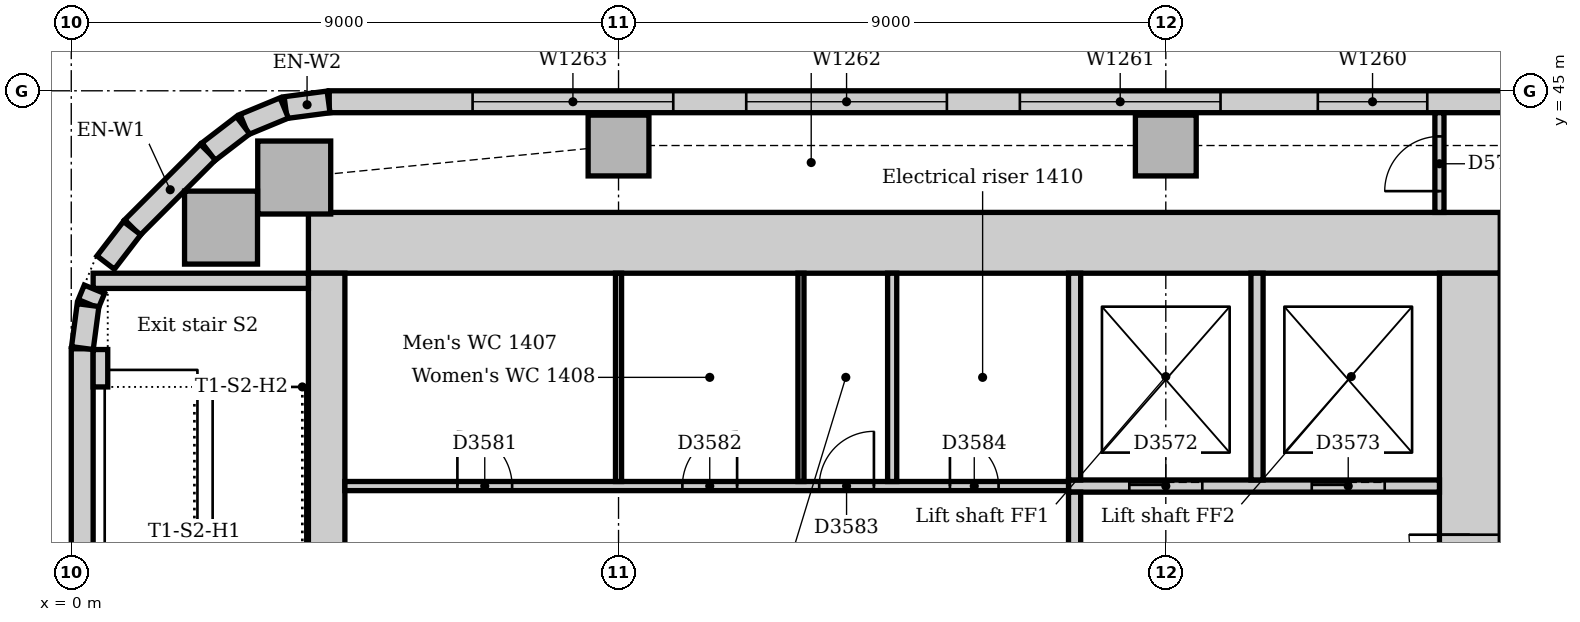
"""IFC4 building model, lengths in metres.
Left out: names, types, materials, properties, quantities, classifications, styles, units other than length and angle.
Written with IfcOpenShell. Run it as: python <this file> out.ifc"""

import sys

from ifc_helpers import new_model, si_unit, direction, frame, frame_2d, origin, origin_2d, place, context, subcontext, project, spatial, rectangle, extrude, element, fill, save


model = new_model("IFC4")
c1 = context("Model", 3, precision=1e-05, world=origin(), true_north=direction((0.0, 1.0)))
c2 = subcontext(c1, "Body", "Model", "MODEL_VIEW")
j1 = project(units=[si_unit("LENGTHUNIT", "METRE"), si_unit("PLANEANGLEUNIT", "RADIAN")], contexts=[c1])
p1 = place(None, origin())
s1 = spatial("IfcSite", under=j1, at=p1, CompositionType="ELEMENT")
p2 = place(p1, origin())
s2 = spatial("IfcBuilding", under=s1, at=p2, CompositionType="ELEMENT")
p3 = place(p2, frame((0.0, 0.0, 63.0)))
s3 = spatial("IfcBuildingStorey", under=s2, at=p3, CompositionType="ELEMENT", Elevation=63.0)
p4 = place(p3, frame((23.5, 42.5, 0.0), z_axis=(0.0, 0.0, 1.0), x_axis=(-1.0, 0.0, 0.0)))
e1 = element("IfcWall", 1, at=p4, inside=s3, PredefinedType="SOLIDWALL", context=c2, shape_type="SweptSolid", body=[
    extrude(rectangle(XDim=19.6, YDim=1.0, at=frame_2d((9.8, 0.0))), origin(), (0.0, 0.0, 1.0), 4.0),
])
p5 = place(p3, frame((23.0, 31.5, 0.0), z_axis=(0.0, 0.0, 1.0), x_axis=(0.0, 1.0, 0.0)))
e2 = element("IfcWall", 2, at=p5, inside=s3, PredefinedType="SOLIDWALL", context=c2, shape_type="SweptSolid", body=[
    extrude(rectangle(XDim=10.5, YDim=1.0, at=frame_2d((5.25, 0.0))), origin(), (0.0, 0.0, 1.0), 4.0),
])
p6 = place(p5, frame((3.15, 0.0, 0.0)))
e3 = element("IfcOpeningElement", 3, at=p6, cuts=e2, PredefinedType="OPENING", context=c2, shape_type="SweptSolid", body=[
    extrude(rectangle(XDim=1.0, YDim=2.1, at=frame_2d((0.5, 1.05))), frame((0.0, 0.51, 0.0), z_axis=(0.0, -1.0, 0.0), x_axis=(1.0, 0.0, 0.0)), (0.0, 0.0, 1.0), 1.02),
])
p7 = place(p5, frame((5.2, 0.0, 0.0)))
e4 = element("IfcOpeningElement", 4, at=p7, cuts=e2, PredefinedType="OPENING", context=c2, shape_type="SweptSolid", body=[
    extrude(rectangle(XDim=1.0, YDim=2.1, at=frame_2d((0.5, 1.05))), frame((0.0, 0.51, 0.0), z_axis=(0.0, -1.0, 0.0), x_axis=(1.0, 0.0, 0.0)), (0.0, 0.0, 1.0), 1.02),
])
p8 = place(p3, frame((4.2, 42.0, 0.0), z_axis=(0.0, 0.0, 1.0), x_axis=(0.0, -1.0, 0.0)))
e5 = element("IfcWall", 5, at=p8, inside=s3, PredefinedType="SOLIDWALL", context=c2, shape_type="SweptSolid", body=[
    extrude(rectangle(XDim=10.5, YDim=0.6, at=frame_2d((5.25, 0.0))), origin(), (0.0, 0.0, 1.0), 4.0),
])
p9 = place(p8, frame((5.3, 0.0, 0.0)))
e6 = element("IfcOpeningElement", 6, at=p9, cuts=e5, PredefinedType="OPENING", context=c2, shape_type="SweptSolid", body=[
    extrude(rectangle(XDim=1.0, YDim=2.1, at=frame_2d((0.5, 1.05))), frame((0.0, 0.31, 0.0), z_axis=(0.0, -1.0, 0.0), x_axis=(1.0, 0.0, 0.0)), (0.0, 0.0, 1.0), 0.62),
])
p10 = place(p3, frame((3.9, 41.875, 0.0), z_axis=(0.0, 0.0, 1.0), x_axis=(-1.0, 0.0, 0.0)))
e7 = element("IfcWall", 7, at=p10, inside=s3, PredefinedType="SOLIDWALL", context=c2, shape_type="SweptSolid", body=[
    extrude(rectangle(XDim=3.54, YDim=0.25, at=frame_2d((1.77, 0.0))), origin(), (0.0, 0.0, 1.0), 4.0),
])
for number, where, z_axis, x_axis in (
    (8, (3.667, 43.574, 0.0), (0.0, 0.0, 1.0), (1.0, 0.0, 0.0)),
    (9, (2.463, 42.75, 0.0), (0.0, 0.0, 1.0), (1.0, 0.0, 0.0)),
):
    element("IfcColumn", number, at=place(p3, frame(where, z_axis=z_axis, x_axis=x_axis)), inside=s3, PredefinedType="COLUMN", context=c2, shape_type="SweptSolid", body=[
        extrude(rectangle(XDim=1.2, YDim=1.2, at=origin_2d()), origin(), (0.0, 0.0, 1.0), 3.85),
    ])
for number, where, z_axis, x_axis in (
    (10, (9.0, 44.1, 0.0), (0.0, 0.0, 1.0), (1.0, 0.0, 0.0)),
    (11, (18.0, 44.1, 0.0), (0.0, 0.0, 1.0), (1.0, 0.0, 0.0)),
):
    element("IfcColumn", number, at=place(p3, frame(where, z_axis=z_axis, x_axis=x_axis)), inside=s3, PredefinedType="COLUMN", context=c2, shape_type="SweptSolid", body=[
        extrude(rectangle(XDim=1.0, YDim=1.0, at=origin_2d()), origin(), (0.0, 0.0, 1.0), 3.85),
    ])
p11 = place(p3, frame((48.257, 44.82, 0.0), z_axis=(0.0, 0.0, 1.0), x_axis=(-1.0, 0.0, 0.0)))
e12 = element("IfcWall", 12, at=p11, inside=s3, PredefinedType="STANDARD", context=c2, shape_type="SweptSolid", body=[
    extrude(rectangle(XDim=44.015, YDim=0.36, at=frame_2d((22.007, 0.0))), origin(), (0.0, 0.0, 1.0), 3.85),
])
p12 = place(p11, frame((2.357, 0.0, 0.9)))
e13 = element("IfcOpeningElement", 13, at=p12, cuts=e12, PredefinedType="OPENING", context=c2, shape_type="SweptSolid", body=[
    extrude(rectangle(XDim=3.3, YDim=1.6, at=frame_2d((1.65, 0.8))), frame((0.0, 0.19, 0.0), z_axis=(0.0, -1.0, 0.0), x_axis=(1.0, 0.0, 0.0)), (0.0, 0.0, 1.0), 0.38),
])
p13 = place(p11, frame((6.857, 0.0, 0.9)))
e14 = element("IfcOpeningElement", 14, at=p13, cuts=e12, PredefinedType="OPENING", context=c2, shape_type="SweptSolid", body=[
    extrude(rectangle(XDim=3.3, YDim=1.6, at=frame_2d((1.65, 0.8))), frame((0.0, 0.19, 0.0), z_axis=(0.0, -1.0, 0.0), x_axis=(1.0, 0.0, 0.0)), (0.0, 0.0, 1.0), 0.38),
])
p14 = place(p11, frame((11.357, 0.0, 0.9)))
e15 = element("IfcOpeningElement", 15, at=p14, cuts=e12, PredefinedType="OPENING", context=c2, shape_type="SweptSolid", body=[
    extrude(rectangle(XDim=3.3, YDim=1.6, at=frame_2d((1.65, 0.8))), frame((0.0, 0.19, 0.0), z_axis=(0.0, -1.0, 0.0), x_axis=(1.0, 0.0, 0.0)), (0.0, 0.0, 1.0), 0.38),
])
p15 = place(p11, frame((15.857, 0.0, 0.9)))
e16 = element("IfcOpeningElement", 16, at=p15, cuts=e12, PredefinedType="OPENING", context=c2, shape_type="SweptSolid", body=[
    extrude(rectangle(XDim=3.3, YDim=1.6, at=frame_2d((1.65, 0.8))), frame((0.0, 0.19, 0.0), z_axis=(0.0, -1.0, 0.0), x_axis=(1.0, 0.0, 0.0)), (0.0, 0.0, 1.0), 0.38),
])
p16 = place(p11, frame((20.357, 0.0, 0.9)))
e17 = element("IfcOpeningElement", 17, at=p16, cuts=e12, PredefinedType="OPENING", context=c2, shape_type="SweptSolid", body=[
    extrude(rectangle(XDim=3.3, YDim=1.6, at=frame_2d((1.65, 0.8))), frame((0.0, 0.19, 0.0), z_axis=(0.0, -1.0, 0.0), x_axis=(1.0, 0.0, 0.0)), (0.0, 0.0, 1.0), 0.38),
])
p17 = place(p11, frame((25.957, 0.0, 0.9)))
e18 = element("IfcOpeningElement", 18, at=p17, cuts=e12, PredefinedType="OPENING", context=c2, shape_type="SweptSolid", body=[
    extrude(rectangle(XDim=1.8, YDim=1.6, at=frame_2d((0.9, 0.8))), frame((0.0, 0.19, 0.0), z_axis=(0.0, -1.0, 0.0), x_axis=(1.0, 0.0, 0.0)), (0.0, 0.0, 1.0), 0.38),
])
p18 = place(p11, frame((29.357, 0.0, 0.9)))
e19 = element("IfcOpeningElement", 19, at=p18, cuts=e12, PredefinedType="OPENING", context=c2, shape_type="SweptSolid", body=[
    extrude(rectangle(XDim=3.3, YDim=1.6, at=frame_2d((1.65, 0.8))), frame((0.0, 0.19, 0.0), z_axis=(0.0, -1.0, 0.0), x_axis=(1.0, 0.0, 0.0)), (0.0, 0.0, 1.0), 0.38),
])
p19 = place(p11, frame((33.857, 0.0, 0.9)))
e20 = element("IfcOpeningElement", 20, at=p19, cuts=e12, PredefinedType="OPENING", context=c2, shape_type="SweptSolid", body=[
    extrude(rectangle(XDim=3.3, YDim=1.6, at=frame_2d((1.65, 0.8))), frame((0.0, 0.19, 0.0), z_axis=(0.0, -1.0, 0.0), x_axis=(1.0, 0.0, 0.0)), (0.0, 0.0, 1.0), 0.38),
])
p20 = place(p11, frame((38.357, 0.0, 0.9)))
e21 = element("IfcOpeningElement", 21, at=p20, cuts=e12, PredefinedType="OPENING", context=c2, shape_type="SweptSolid", body=[
    extrude(rectangle(XDim=3.3, YDim=1.6, at=frame_2d((1.65, 0.8))), frame((0.0, 0.19, 0.0), z_axis=(0.0, -1.0, 0.0), x_axis=(1.0, 0.0, 0.0)), (0.0, 0.0, 1.0), 0.38),
])
p21 = place(p3, frame((2.249, 43.994, 0.0), z_axis=(0.0, 0.0, 1.0), x_axis=(-0.707106781187, -0.707106781187, 0.0)))
e22 = element("IfcWall", 22, at=p21, inside=s3, PredefinedType="STANDARD", context=c2, shape_type="SweptSolid", body=[
    extrude(rectangle(XDim=1.757, YDim=0.36, at=frame_2d((0.879, 0.0))), origin(), (0.0, 0.0, 1.0), 3.85),
])
p22 = place(p3, frame((0.18, 40.757, 0.0), z_axis=(0.0, 0.0, 1.0), x_axis=(0.0, -1.0, 0.0)))
e23 = element("IfcWall", 23, at=p22, inside=s3, PredefinedType="STANDARD", context=c2, shape_type="SweptSolid", body=[
    extrude(rectangle(XDim=5.507, YDim=0.36, at=frame_2d((2.754, 0.0))), origin(), (0.0, 0.0, 1.0), 3.85),
])
for number, where, z_axis, x_axis in (
    (24, (4.231, 44.817, 0.0), (0.0, 0.0, 1.0), (-0.991, -0.131, 0.0)),
    (25, (3.503, 44.718, 0.0), (0.0, 0.0, 1.0), (-0.924, -0.383, 0.0)),
):
    element("IfcWall", number, at=place(p3, frame(where, z_axis=z_axis, x_axis=x_axis)), inside=s3, PredefinedType="STANDARD", context=c2, shape_type="SweptSolid", body=[
        extrude(rectangle(XDim=0.713, YDim=0.36, at=frame_2d((0.356, 0.0))), origin(), (0.0, 0.0, 1.0), 3.85),
    ])
for number, where, z_axis, x_axis in (
    (26, (2.825, 44.434, 0.0), (0.0, 0.0, 1.0), (-0.793, -0.609, 0.0)),
    (27, (1.0, 42.741, 0.0), (0.0, 0.0, 1.0), (-0.609, -0.793, 0.0)),
):
    element("IfcWall", number, at=place(p3, frame(where, z_axis=z_axis, x_axis=x_axis)), inside=s3, PredefinedType="STANDARD", context=c2, shape_type="SweptSolid", body=[
        extrude(rectangle(XDim=0.713, YDim=0.36, at=frame_2d((0.357, 0.0))), origin(), (0.0, 0.0, 1.0), 3.85),
    ])
p23 = place(p3, frame((0.381, 41.736, 0.0), z_axis=(0.0, 0.0, 1.0), x_axis=(-0.382773360986, -0.923842277729, 0.0)))
e28 = element("IfcWall", 28, at=p23, inside=s3, PredefinedType="STANDARD", context=c2, shape_type="SweptSolid", body=[
    extrude(rectangle(XDim=0.258, YDim=0.36, at=frame_2d((0.129, 0.0))), origin(), (0.0, 0.0, 1.0), 3.85),
])
p24 = place(p3, frame((0.276, 41.476, 0.0), z_axis=(0.0, 0.0, 1.0), x_axis=(-0.13055608231, -0.99144092581, 0.0)))
e29 = element("IfcWall", 29, at=p24, inside=s3, PredefinedType="STANDARD", context=c2, shape_type="SweptSolid", body=[
    extrude(rectangle(XDim=0.713, YDim=0.36, at=frame_2d((0.356, 0.0))), origin(), (0.0, 0.0, 1.0), 3.85),
])
p25 = place(p3, frame((0.48, 40.13, 0.0), z_axis=(0.0, 0.0, 1.0), x_axis=(0.0, 1.0, 0.0)))
e30 = element("IfcWall", 30, at=p25, inside=s3, PredefinedType="STANDARD", context=c2, shape_type="SweptSolid", body=[
    extrude(rectangle(XDim=0.615, YDim=0.24, at=frame_2d((0.307, 0.0))), origin(), (0.0, 0.0, 1.0), 4.0),
])
p26 = place(p3, frame((16.4, 38.5, 0.0), z_axis=(0.0, 0.0, 1.0), x_axis=(1.0, 0.0, 0.0)))
e31 = element("IfcWall", 31, at=p26, inside=s3, PredefinedType="PARTITIONING", context=c2, shape_type="SweptSolid", body=[
    extrude(rectangle(XDim=6.1, YDim=0.2, at=frame_2d((3.05, 0.0))), origin(), (0.0, 0.0, 1.0), 3.85),
])
p27 = place(p26, frame((1.0, 0.0, 0.0)))
e32 = element("IfcOpeningElement", 32, at=p27, cuts=e31, PredefinedType="OPENING", context=c2, shape_type="SweptSolid", body=[
    extrude(rectangle(XDim=1.2, YDim=2.1, at=frame_2d((0.6, 1.05))), frame((0.0, 0.11, 0.0), z_axis=(0.0, -1.0, 0.0), x_axis=(1.0, 0.0, 0.0)), (0.0, 0.0, 1.0), 0.22),
])
p28 = place(p26, frame((4.0, 0.0, 0.0)))
e33 = element("IfcOpeningElement", 33, at=p28, cuts=e31, PredefinedType="OPENING", context=c2, shape_type="SweptSolid", body=[
    extrude(rectangle(XDim=1.2, YDim=2.1, at=frame_2d((0.6, 1.05))), frame((0.0, 0.11, 0.0), z_axis=(0.0, -1.0, 0.0), x_axis=(1.0, 0.0, 0.0)), (0.0, 0.0, 1.0), 0.22),
])
p29 = place(p3, frame((16.5, 35.85, 0.0), z_axis=(0.0, 0.0, 1.0), x_axis=(0.0, 1.0, 0.0)))
e34 = element("IfcWall", 34, at=p29, inside=s3, PredefinedType="PARTITIONING", context=c2, shape_type="SweptSolid", body=[
    extrude(rectangle(XDim=2.55, YDim=0.2, at=frame_2d((1.275, 0.0))), origin(), (0.0, 0.0, 1.0), 3.85),
])
for number, where, z_axis, x_axis in (
    (35, (16.5, 38.6, 0.0), (0.0, 0.0, 1.0), (0.0, 1.0, 0.0)),
    (36, (19.5, 38.6, 0.0), (0.0, 0.0, 1.0), (0.0, 1.0, 0.0)),
):
    element("IfcWall", number, at=place(p3, frame(where, z_axis=z_axis, x_axis=x_axis)), inside=s3, PredefinedType="PARTITIONING", context=c2, shape_type="SweptSolid", body=[
        extrude(rectangle(XDim=3.4, YDim=0.2, at=frame_2d((1.7, 0.0))), origin(), (0.0, 0.0, 1.0), 3.85),
    ])
p30 = place(p3, frame((4.5, 38.5, 0.0), z_axis=(0.0, 0.0, 1.0), x_axis=(1.0, 0.0, 0.0)))
e37 = element("IfcWall", 37, at=p30, inside=s3, PredefinedType="PARTITIONING", context=c2, shape_type="SweptSolid", body=[
    extrude(rectangle(XDim=11.9, YDim=0.15, at=frame_2d((5.95, 0.0))), origin(), (0.0, 0.0, 1.0), 3.85),
])
p31 = place(p30, frame((1.85, 0.0, 0.0)))
e38 = element("IfcOpeningElement", 38, at=p31, cuts=e37, PredefinedType="OPENING", context=c2, shape_type="SweptSolid", body=[
    extrude(rectangle(XDim=0.9, YDim=2.1, at=frame_2d((0.45, 1.05))), frame((0.0, 0.085, 0.0), z_axis=(0.0, -1.0, 0.0), x_axis=(1.0, 0.0, 0.0)), (0.0, 0.0, 1.0), 0.17),
])
p32 = place(p30, frame((5.55, 0.0, 0.0)))
e39 = element("IfcOpeningElement", 39, at=p32, cuts=e37, PredefinedType="OPENING", context=c2, shape_type="SweptSolid", body=[
    extrude(rectangle(XDim=0.9, YDim=2.1, at=frame_2d((0.45, 1.05))), frame((0.0, 0.085, 0.0), z_axis=(0.0, -1.0, 0.0), x_axis=(1.0, 0.0, 0.0)), (0.0, 0.0, 1.0), 0.17),
])
p33 = place(p30, frame((7.8, 0.0, 0.0)))
e40 = element("IfcOpeningElement", 40, at=p33, cuts=e37, PredefinedType="OPENING", context=c2, shape_type="SweptSolid", body=[
    extrude(rectangle(XDim=0.9, YDim=2.1, at=frame_2d((0.45, 1.05))), frame((0.0, 0.085, 0.0), z_axis=(0.0, -1.0, 0.0), x_axis=(1.0, 0.0, 0.0)), (0.0, 0.0, 1.0), 0.17),
])
p34 = place(p30, frame((9.95, 0.0, 0.0)))
e41 = element("IfcOpeningElement", 41, at=p34, cuts=e37, PredefinedType="OPENING", context=c2, shape_type="SweptSolid", body=[
    extrude(rectangle(XDim=0.8, YDim=2.1, at=frame_2d((0.4, 1.05))), frame((0.0, 0.085, 0.0), z_axis=(0.0, -1.0, 0.0), x_axis=(1.0, 0.0, 0.0)), (0.0, 0.0, 1.0), 0.17),
])
p35 = place(p3, frame((22.5, 43.0, 0.0), z_axis=(0.0, 0.0, 1.0), x_axis=(0.0, 1.0, 0.0)))
e42 = element("IfcWall", 42, at=p35, inside=s3, PredefinedType="PARTITIONING", context=c2, shape_type="SweptSolid", body=[
    extrude(rectangle(XDim=1.64, YDim=0.15, at=frame_2d((0.82, 0.0))), origin(), (0.0, 0.0, 1.0), 3.85),
])
p36 = place(p35, frame((0.35, 0.0, 0.0)))
e43 = element("IfcOpeningElement", 43, at=p36, cuts=e42, PredefinedType="OPENING", context=c2, shape_type="SweptSolid", body=[
    extrude(rectangle(XDim=0.9, YDim=2.1, at=frame_2d((0.45, 1.05))), frame((0.0, 0.085, 0.0), z_axis=(0.0, -1.0, 0.0), x_axis=(1.0, 0.0, 0.0)), (0.0, 0.0, 1.0), 0.17),
])
p37 = place(p3, frame((13.5, 38.575, 0.0), z_axis=(0.0, 0.0, 1.0), x_axis=(0.0, 1.0, 0.0)))
e44 = element("IfcWall", 44, at=p37, inside=s3, PredefinedType="PARTITIONING", context=c2, shape_type="SweptSolid", body=[
    extrude(rectangle(XDim=3.425, YDim=0.15, at=frame_2d((1.712, 0.0))), origin(), (0.0, 0.0, 1.0), 3.85),
])
for number, where, z_axis, x_axis in (
    (45, (9.0, 38.575, 0.0), (0.0, 0.0, 1.0), (0.0, 1.0, 0.0)),
    (46, (12.0, 38.575, 0.0), (0.0, 0.0, 1.0), (0.0, 1.0, 0.0)),
):
    element("IfcWall", number, at=place(p3, frame(where, z_axis=z_axis, x_axis=x_axis)), inside=s3, PredefinedType="PARTITIONING", context=c2, shape_type="SweptSolid", body=[
        extrude(rectangle(XDim=3.425, YDim=0.1, at=frame_2d((1.712, 0.0))), origin(), (0.0, 0.0, 1.0), 3.85),
    ])
p38 = place(p17, origin())
e47 = element("IfcWindow", 47, at=p38, inside=s3, PartitioningType="SINGLE_PANEL", PredefinedType="WINDOW", context=c2, shape_type="SweptSolid", body=[
    extrude(rectangle(XDim=1.8, YDim=1.6, at=frame_2d((0.9, 0.8))), frame((0.0, 0.13, 0.0), z_axis=(0.0, -1.0, 0.0), x_axis=(1.0, 0.0, 0.0)), (0.0, 0.0, 1.0), 0.06),
])
fill(e18, e47)
p39 = place(p18, origin())
e48 = element("IfcWindow", 48, at=p39, inside=s3, PartitioningType="SINGLE_PANEL", PredefinedType="WINDOW", context=c2, shape_type="SweptSolid", body=[
    extrude(rectangle(XDim=3.3, YDim=1.6, at=frame_2d((1.65, 0.8))), frame((0.0, 0.13, 0.0), z_axis=(0.0, -1.0, 0.0), x_axis=(1.0, 0.0, 0.0)), (0.0, 0.0, 1.0), 0.06),
])
fill(e19, e48)
p40 = place(p19, origin())
e49 = element("IfcWindow", 49, at=p40, inside=s3, PartitioningType="SINGLE_PANEL", PredefinedType="WINDOW", context=c2, shape_type="SweptSolid", body=[
    extrude(rectangle(XDim=3.3, YDim=1.6, at=frame_2d((1.65, 0.8))), frame((0.0, 0.13, 0.0), z_axis=(0.0, -1.0, 0.0), x_axis=(1.0, 0.0, 0.0)), (0.0, 0.0, 1.0), 0.06),
])
fill(e20, e49)
p41 = place(p20, origin())
e50 = element("IfcWindow", 50, at=p41, inside=s3, PartitioningType="SINGLE_PANEL", PredefinedType="WINDOW", context=c2, shape_type="SweptSolid", body=[
    extrude(rectangle(XDim=3.3, YDim=1.6, at=frame_2d((1.65, 0.8))), frame((0.0, 0.13, 0.0), z_axis=(0.0, -1.0, 0.0), x_axis=(1.0, 0.0, 0.0)), (0.0, 0.0, 1.0), 0.06),
])
fill(e21, e50)
p42 = place(p27, origin())
e51 = element("IfcDoor", 51, at=p42, inside=s3, OperationType="SLIDING_TO_LEFT", PredefinedType="DOOR", context=c2, shape_type="SweptSolid", body=[
    extrude(rectangle(XDim=1.2, YDim=2.1, at=frame_2d((0.6, 1.05))), frame((0.0, 0.025, 0.0), z_axis=(0.0, -1.0, 0.0), x_axis=(1.0, 0.0, 0.0)), (0.0, 0.0, 1.0), 0.05),
])
fill(e32, e51)
p43 = place(p28, origin())
e52 = element("IfcDoor", 52, at=p43, inside=s3, OperationType="SLIDING_TO_LEFT", PredefinedType="DOOR", context=c2, shape_type="SweptSolid", body=[
    extrude(rectangle(XDim=1.2, YDim=2.1, at=frame_2d((0.6, 1.05))), frame((0.0, 0.025, 0.0), z_axis=(0.0, -1.0, 0.0), x_axis=(1.0, 0.0, 0.0)), (0.0, 0.0, 1.0), 0.05),
])
fill(e33, e52)
p44 = place(p7, origin())
e53 = element("IfcDoor", 53, at=p44, inside=s3, OperationType="SINGLE_SWING_RIGHT", PredefinedType="DOOR", context=c2, shape_type="SweptSolid", body=[
    extrude(rectangle(XDim=1.0, YDim=2.1, at=frame_2d((0.5, 1.05))), frame((0.0, 0.025, 0.0), z_axis=(0.0, -1.0, 0.0), x_axis=(1.0, 0.0, 0.0)), (0.0, 0.0, 1.0), 0.05),
])
fill(e4, e53)
p45 = place(p31, origin())
e54 = element("IfcDoor", 54, at=p45, inside=s3, OperationType="SINGLE_SWING_LEFT", PredefinedType="DOOR", context=c2, shape_type="SweptSolid", body=[
    extrude(rectangle(XDim=0.9, YDim=2.1, at=frame_2d((0.45, 1.05))), frame((0.0, 0.025, 0.0), z_axis=(0.0, -1.0, 0.0), x_axis=(1.0, 0.0, 0.0)), (0.0, 0.0, 1.0), 0.05),
])
fill(e38, e54)
p46 = place(p32, origin())
e55 = element("IfcDoor", 55, at=p46, inside=s3, OperationType="SINGLE_SWING_RIGHT", PredefinedType="DOOR", context=c2, shape_type="SweptSolid", body=[
    extrude(rectangle(XDim=0.9, YDim=2.1, at=frame_2d((0.45, 1.05))), frame((0.0, 0.025, 0.0), z_axis=(0.0, -1.0, 0.0), x_axis=(1.0, 0.0, 0.0)), (0.0, 0.0, 1.0), 0.05),
])
fill(e39, e55)
p47 = place(p33, origin())
e56 = element("IfcDoor", 56, at=p47, inside=s3, OperationType="SINGLE_SWING_RIGHT", PredefinedType="DOOR", context=c2, shape_type="SweptSolid", body=[
    extrude(rectangle(XDim=0.9, YDim=2.1, at=frame_2d((0.45, 1.05))), frame((0.0, 0.025, 0.0), z_axis=(0.0, -1.0, 0.0), x_axis=(1.0, 0.0, 0.0)), (0.0, 0.0, 1.0), 0.05),
])
fill(e40, e56)
p48 = place(p34, origin())
e57 = element("IfcDoor", 57, at=p48, inside=s3, OperationType="SINGLE_SWING_LEFT", PredefinedType="DOOR", context=c2, shape_type="SweptSolid", body=[
    extrude(rectangle(XDim=0.8, YDim=2.1, at=frame_2d((0.4, 1.05))), frame((0.0, 0.025, 0.0), z_axis=(0.0, -1.0, 0.0), x_axis=(1.0, 0.0, 0.0)), (0.0, 0.0, 1.0), 0.05),
])
fill(e41, e57)
p49 = place(p36, origin())
e58 = element("IfcDoor", 58, at=p49, inside=s3, OperationType="SINGLE_SWING_LEFT", PredefinedType="DOOR", context=c2, shape_type="SweptSolid", body=[
    extrude(rectangle(XDim=0.9, YDim=2.1, at=frame_2d((0.45, 1.05))), frame((0.0, 0.025, 0.0), z_axis=(0.0, -1.0, 0.0), x_axis=(1.0, 0.0, 0.0)), (0.0, 0.0, 1.0), 0.05),
])
fill(e43, e58)
save(model, sys.argv[1])
